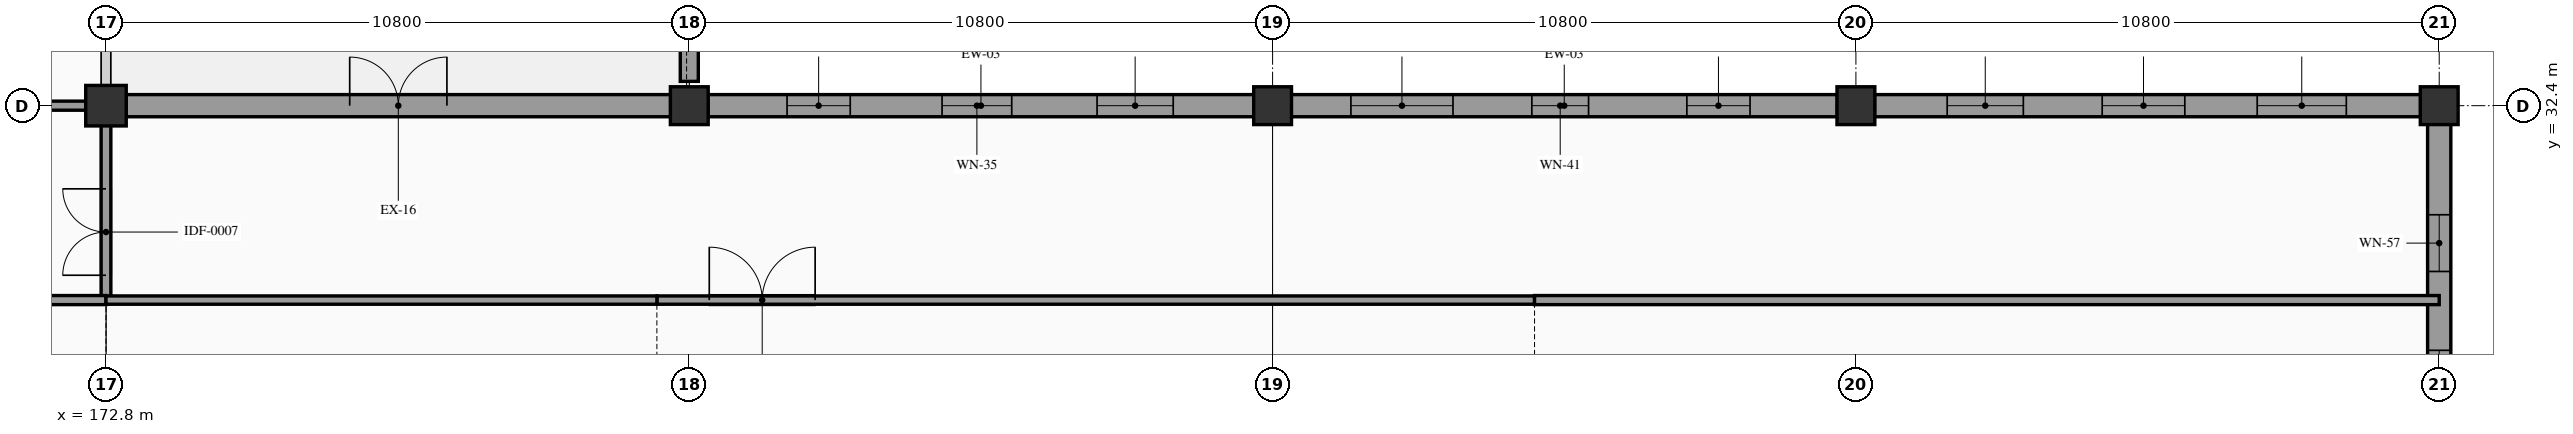
"""IFC4 building model, lengths in metres.
Left out: names, types, materials, properties, quantities, classifications, styles, units other than length and angle.
Written with IfcOpenShell. Run it as: python <this file> out.ifc"""

import sys

from ifc_helpers import new_model, si_unit, direction, frame, frame_2d, origin, origin_2d, place, context, subcontext, project, spatial, rectangle, extrude, element, fill, save


model = new_model("IFC4")
c1 = context("Model", 3, precision=1e-05, world=origin(), true_north=direction((0.0, 1.0)))
c2 = subcontext(c1, "Body", "Model", "MODEL_VIEW")
j1 = project(units=[si_unit("LENGTHUNIT", "METRE"), si_unit("PLANEANGLEUNIT", "RADIAN")], contexts=[c1])
p1 = place(None, origin())
s1 = spatial("IfcSite", under=j1, at=p1, CompositionType="ELEMENT")
p2 = place(p1, origin())
s2 = spatial("IfcBuilding", under=s1, at=p2, CompositionType="ELEMENT")
p3 = place(p2, origin())
s3 = spatial("IfcBuildingStorey", under=s2, at=p3, CompositionType="ELEMENT", Elevation=0.0)
p4 = place(p3, frame((172.8, 32.4, -1.2), z_axis=(0.0, 0.0, 1.0), x_axis=(1.0, 0.0, 0.0)))
e1 = element("IfcColumn", 1, at=p4, inside=s3, PredefinedType="COLUMN", context=c2, shape_type="SweptSolid", body=[
    extrude(rectangle(XDim=0.75, YDim=0.75, at=origin_2d()), origin(), (0.0, 0.0, 1.0), 6.6),
])
for number, where, z_axis, x_axis in (
    (2, (183.6, 32.4, -1.2), (0.0, 0.0, 1.0), (1.0, 0.0, 0.0)),
    (3, (194.4, 32.4, -1.2), (0.0, 0.0, 1.0), (1.0, 0.0, 0.0)),
    (4, (205.2, 32.4, -1.2), (0.0, 0.0, 1.0), (1.0, 0.0, 0.0)),
    (5, (216.0, 32.4, -1.2), (0.0, 0.0, 1.0), (1.0, 0.0, 0.0)),
):
    element("IfcColumn", number, at=place(p3, frame(where, z_axis=z_axis, x_axis=x_axis)), inside=s3, PredefinedType="COLUMN", context=c2, shape_type="SweptSolid", body=[
        extrude(rectangle(XDim=0.7, YDim=0.7, at=origin_2d()), origin(), (0.0, 0.0, 1.0), 6.6),
    ])
p5 = place(p3, frame((216.0, 0.45, -1.2), z_axis=(0.0, 0.0, 1.0), x_axis=(0.0, 1.0, 0.0)))
e6 = element("IfcWall", 6, at=p5, inside=s3, PredefinedType="USERDEFINED", context=c2, shape_type="SweptSolid", body=[
    extrude(rectangle(XDim=31.5, YDim=0.374, at=frame_2d((15.75, 0.0))), origin(), (0.0, 0.0, 1.0), 0.14),
])
p6 = place(p3, frame((183.6, 32.85, -1.2), z_axis=(0.0, 0.0, 1.0), x_axis=(0.0, 1.0, 0.0)))
e7 = element("IfcWall", 7, at=p6, inside=s3, PredefinedType="USERDEFINED", context=c2, shape_type="SweptSolid", body=[
    extrude(rectangle(XDim=63.9, YDim=0.334, at=frame_2d((31.95, 0.0))), origin(), (0.0, 0.0, 1.0), 0.14),
])
p7 = place(p3, frame((173.17, 32.4, 0.0), z_axis=(0.0, 0.0, 1.0), x_axis=(1.0, 0.0, 0.0)))
e8 = element("IfcWall", 8, at=p7, inside=s3, PredefinedType="STANDARD", context=c2, shape_type="SweptSolid", body=[
    extrude(rectangle(XDim=10.085, YDim=0.41, at=frame_2d((5.042, 0.0))), origin(), (0.0, 0.0, 1.0), 4.225),
])
p8 = place(p7, frame((4.143, 0.0, 0.0)))
e9 = element("IfcOpeningElement", 9, at=p8, cuts=e8, PredefinedType="OPENING", context=c2, shape_type="SweptSolid", body=[
    extrude(rectangle(XDim=1.8, YDim=2.3, at=frame_2d((0.9, 1.15))), frame((0.0, 0.215, 0.0), z_axis=(0.0, -1.0, 0.0), x_axis=(1.0, 0.0, 0.0)), (0.0, 0.0, 1.0), 0.43),
])
p9 = place(p3, frame((183.945, 32.4, 0.0), z_axis=(0.0, 0.0, 1.0), x_axis=(1.0, 0.0, 0.0)))
e10 = element("IfcWall", 10, at=p9, inside=s3, PredefinedType="STANDARD", context=c2, shape_type="SweptSolid", body=[
    extrude(rectangle(XDim=10.11, YDim=0.41, at=frame_2d((5.055, 0.0))), origin(), (0.0, 0.0, 1.0), 4.225),
])
p10 = place(p9, frame((1.465, 0.0, 0.95)))
e11 = element("IfcOpeningElement", 11, at=p10, cuts=e10, PredefinedType="OPENING", context=c2, shape_type="SweptSolid", body=[
    extrude(rectangle(XDim=1.17, YDim=1.5, at=frame_2d((0.585, 0.75))), frame((0.0, 0.215, 0.0), z_axis=(0.0, -1.0, 0.0), x_axis=(1.0, 0.0, 0.0)), (0.0, 0.0, 1.0), 0.43),
])
p11 = place(p9, frame((4.335, 0.0, 0.95)))
e12 = element("IfcOpeningElement", 12, at=p11, cuts=e10, PredefinedType="OPENING", context=c2, shape_type="SweptSolid", body=[
    extrude(rectangle(XDim=1.29, YDim=1.5, at=frame_2d((0.645, 0.75))), frame((0.0, 0.215, 0.0), z_axis=(0.0, -1.0, 0.0), x_axis=(1.0, 0.0, 0.0)), (0.0, 0.0, 1.0), 0.43),
])
p12 = place(p9, frame((7.205, 0.0, 0.95)))
e13 = element("IfcOpeningElement", 13, at=p12, cuts=e10, PredefinedType="OPENING", context=c2, shape_type="SweptSolid", body=[
    extrude(rectangle(XDim=1.41, YDim=1.5, at=frame_2d((0.705, 0.75))), frame((0.0, 0.215, 0.0), z_axis=(0.0, -1.0, 0.0), x_axis=(1.0, 0.0, 0.0)), (0.0, 0.0, 1.0), 0.43),
])
p13 = place(p3, frame((194.745, 32.4, 0.0), z_axis=(0.0, 0.0, 1.0), x_axis=(1.0, 0.0, 0.0)))
e14 = element("IfcWall", 14, at=p13, inside=s3, PredefinedType="STANDARD", context=c2, shape_type="SweptSolid", body=[
    extrude(rectangle(XDim=10.11, YDim=0.41, at=frame_2d((5.055, 0.0))), origin(), (0.0, 0.0, 1.0), 4.225),
])
p14 = place(p13, frame((1.105, 0.0, 0.95)))
e15 = element("IfcOpeningElement", 15, at=p14, cuts=e14, PredefinedType="OPENING", context=c2, shape_type="SweptSolid", body=[
    extrude(rectangle(XDim=1.89, YDim=1.5, at=frame_2d((0.945, 0.75))), frame((0.0, 0.215, 0.0), z_axis=(0.0, -1.0, 0.0), x_axis=(1.0, 0.0, 0.0)), (0.0, 0.0, 1.0), 0.43),
])
p15 = place(p13, frame((4.455, 0.0, 0.95)))
e16 = element("IfcOpeningElement", 16, at=p15, cuts=e14, PredefinedType="OPENING", context=c2, shape_type="SweptSolid", body=[
    extrude(rectangle(XDim=1.05, YDim=1.65, at=frame_2d((0.525, 0.825))), frame((0.0, 0.215, 0.0), z_axis=(0.0, -1.0, 0.0), x_axis=(1.0, 0.0, 0.0)), (0.0, 0.0, 1.0), 0.43),
])
p16 = place(p13, frame((7.325, 0.0, 0.95)))
e17 = element("IfcOpeningElement", 17, at=p16, cuts=e14, PredefinedType="OPENING", context=c2, shape_type="SweptSolid", body=[
    extrude(rectangle(XDim=1.17, YDim=1.65, at=frame_2d((0.585, 0.825))), frame((0.0, 0.215, 0.0), z_axis=(0.0, -1.0, 0.0), x_axis=(1.0, 0.0, 0.0)), (0.0, 0.0, 1.0), 0.43),
])
p17 = place(p3, frame((205.545, 32.4, 0.0), z_axis=(0.0, 0.0, 1.0), x_axis=(1.0, 0.0, 0.0)))
e18 = element("IfcWall", 18, at=p17, inside=s3, PredefinedType="STANDARD", context=c2, shape_type="SweptSolid", body=[
    extrude(rectangle(XDim=10.11, YDim=0.41, at=frame_2d((5.055, 0.0))), origin(), (0.0, 0.0, 1.0), 4.225),
])
p18 = place(p17, frame((1.345, 0.0, 0.95)))
e19 = element("IfcOpeningElement", 19, at=p18, cuts=e18, PredefinedType="OPENING", context=c2, shape_type="SweptSolid", body=[
    extrude(rectangle(XDim=1.41, YDim=1.8, at=frame_2d((0.705, 0.9))), frame((0.0, 0.215, 0.0), z_axis=(0.0, -1.0, 0.0), x_axis=(1.0, 0.0, 0.0)), (0.0, 0.0, 1.0), 0.43),
])
p19 = place(p17, frame((4.215, 0.0, 0.95)))
e20 = element("IfcOpeningElement", 20, at=p19, cuts=e18, PredefinedType="OPENING", context=c2, shape_type="SweptSolid", body=[
    extrude(rectangle(XDim=1.53, YDim=1.8, at=frame_2d((0.765, 0.9))), frame((0.0, 0.215, 0.0), z_axis=(0.0, -1.0, 0.0), x_axis=(1.0, 0.0, 0.0)), (0.0, 0.0, 1.0), 0.43),
])
p20 = place(p17, frame((7.085, 0.0, 0.95)))
e21 = element("IfcOpeningElement", 21, at=p20, cuts=e18, PredefinedType="OPENING", context=c2, shape_type="SweptSolid", body=[
    extrude(rectangle(XDim=1.65, YDim=1.8, at=frame_2d((0.825, 0.9))), frame((0.0, 0.215, 0.0), z_axis=(0.0, -1.0, 0.0), x_axis=(1.0, 0.0, 0.0)), (0.0, 0.0, 1.0), 0.43),
])
p21 = place(p3, frame((216.0, 21.945, 0.0), z_axis=(0.0, 0.0, 1.0), x_axis=(0.0, 1.0, 0.0)))
e22 = element("IfcWall", 22, at=p21, inside=s3, PredefinedType="STANDARD", context=c2, shape_type="SweptSolid", body=[
    extrude(rectangle(XDim=10.11, YDim=0.43, at=frame_2d((5.055, 0.0))), origin(), (0.0, 0.0, 1.0), 4.225),
])
p22 = place(p21, frame((1.165, 0.0, 0.95)))
e23 = element("IfcOpeningElement", 23, at=p22, cuts=e22, PredefinedType="OPENING", context=c2, shape_type="SweptSolid", body=[
    extrude(rectangle(XDim=1.77, YDim=1.8, at=frame_2d((0.885, 0.9))), frame((0.0, 0.225, 0.0), z_axis=(0.0, -1.0, 0.0), x_axis=(1.0, 0.0, 0.0)), (0.0, 0.0, 1.0), 0.45),
])
p23 = place(p21, frame((4.035, 0.0, 0.95)))
e24 = element("IfcOpeningElement", 24, at=p23, cuts=e22, PredefinedType="OPENING", context=c2, shape_type="SweptSolid", body=[
    extrude(rectangle(XDim=1.89, YDim=1.8, at=frame_2d((0.945, 0.9))), frame((0.0, 0.225, 0.0), z_axis=(0.0, -1.0, 0.0), x_axis=(1.0, 0.0, 0.0)), (0.0, 0.0, 1.0), 0.45),
])
p24 = place(p21, frame((7.385, 0.0, 0.95)))
e25 = element("IfcOpeningElement", 25, at=p24, cuts=e22, PredefinedType="OPENING", context=c2, shape_type="SweptSolid", body=[
    extrude(rectangle(XDim=1.05, YDim=1.95, at=frame_2d((0.525, 0.975))), frame((0.0, 0.225, 0.0), z_axis=(0.0, -1.0, 0.0), x_axis=(1.0, 0.0, 0.0)), (0.0, 0.0, 1.0), 0.45),
])
p25 = place(p3, frame((172.8, 28.8, 0.0), z_axis=(0.0, 0.0, 1.0), x_axis=(0.0, 1.0, 0.0)))
e26 = element("IfcWall", 26, at=p25, inside=s3, PredefinedType="PARTITIONING", context=c2, shape_type="SweptSolid", body=[
    extrude(rectangle(XDim=3.6, YDim=0.18, at=frame_2d((1.8, 0.0))), origin(), (0.0, 0.0, 1.0), 3.95),
])
p26 = place(p25, frame((0.46, 0.0, 0.0)))
e27 = element("IfcOpeningElement", 27, at=p26, cuts=e26, PredefinedType="OPENING", context=c2, shape_type="SweptSolid", body=[
    extrude(rectangle(XDim=1.6, YDim=2.2, at=frame_2d((0.8, 1.1))), frame((0.0, 0.1, 0.0), z_axis=(0.0, -1.0, 0.0), x_axis=(1.0, 0.0, 0.0)), (0.0, 0.0, 1.0), 0.2),
])
p27 = place(p3, frame((183.0, 28.8, 0.0), z_axis=(0.0, 0.0, 1.0), x_axis=(1.0, 0.0, 0.0)))
e28 = element("IfcWall", 28, at=p27, inside=s3, PredefinedType="PARTITIONING", context=c2, shape_type="SweptSolid", body=[
    extrude(rectangle(XDim=16.25, YDim=0.154, at=frame_2d((8.125, 0.0))), origin(), (0.0, 0.0, 1.0), 3.95),
])
p28 = place(p27, frame((0.97, 0.0, 0.0)))
e29 = element("IfcOpeningElement", 29, at=p28, cuts=e28, PredefinedType="OPENING", context=c2, shape_type="SweptSolid", body=[
    extrude(rectangle(XDim=1.96, YDim=2.3, at=frame_2d((0.98, 1.15))), frame((0.0, 0.087, 0.0), z_axis=(0.0, -1.0, 0.0), x_axis=(1.0, 0.0, 0.0)), (0.0, 0.0, 1.0), 0.174),
])
p29 = place(p3, frame((162.0, 32.4, 0.0), z_axis=(0.0, 0.0, 1.0), x_axis=(1.0, 0.0, 0.0)))
e30 = element("IfcWall", 30, at=p29, inside=s3, PredefinedType="PARTITIONING", context=c2, shape_type="SweptSolid", body=[
    extrude(rectangle(XDim=10.8, YDim=0.168, at=frame_2d((5.4, 0.0))), origin(), (0.0, 0.0, 1.0), 3.95),
])
p30 = place(p3, frame((163.2, 28.8, 0.0), z_axis=(0.0, 0.0, 1.0), x_axis=(1.0, 0.0, 0.0)))
e31 = element("IfcWall", 31, at=p30, inside=s3, PredefinedType="PARTITIONING", context=c2, shape_type="SweptSolid", body=[
    extrude(rectangle(XDim=9.6, YDim=0.168, at=frame_2d((4.8, 0.0))), origin(), (0.0, 0.0, 1.0), 3.95),
])
p31 = place(p3, frame((172.8, 28.8, 0.0), z_axis=(0.0, 0.0, 1.0), x_axis=(1.0, 0.0, 0.0)))
e32 = element("IfcWall", 32, at=p31, inside=s3, PredefinedType="PARTITIONING", context=c2, shape_type="SweptSolid", body=[
    extrude(rectangle(XDim=10.2, YDim=0.154, at=frame_2d((5.1, 0.0))), origin(), (0.0, 0.0, 1.0), 3.95),
])
for number, where, z_axis, x_axis in (
    (33, (183.275, 32.4, 0.0), (0.0, 0.0, 1.0), (1.0, 0.0, 0.0)),
    (34, (194.075, 32.4, 0.0), (0.0, 0.0, 1.0), (1.0, 0.0, 0.0)),
):
    element("IfcWall", number, at=place(p3, frame(where, z_axis=z_axis, x_axis=x_axis)), inside=s3, PredefinedType="PARTITIONING", context=c2, shape_type="SweptSolid", body=[
        extrude(rectangle(XDim=0.65, YDim=0.168, at=frame_2d((0.325, 0.0))), origin(), (0.0, 0.0, 1.0), 3.95),
    ])
p32 = place(p3, frame((204.875, 32.4, 0.0), z_axis=(0.0, 0.0, 1.0), x_axis=(1.0, 0.0, 0.0)))
e35 = element("IfcWall", 35, at=p32, inside=s3, PredefinedType="PARTITIONING", context=c2, shape_type="SweptSolid", body=[
    extrude(rectangle(XDim=0.65, YDim=0.168, at=frame_2d((0.325, 0.0))), origin(), (0.0, 0.0, 1.0), 3.95),
])
p33 = place(p3, frame((199.25, 28.8, 0.0), z_axis=(0.0, 0.0, 1.0), x_axis=(1.0, 0.0, 0.0)))
e36 = element("IfcWall", 36, at=p33, inside=s3, PredefinedType="PARTITIONING", context=c2, shape_type="SweptSolid", body=[
    extrude(rectangle(XDim=16.75, YDim=0.168, at=frame_2d((8.375, 0.0))), origin(), (0.0, 0.0, 1.0), 3.95),
])
p34 = place(p8, origin())
e37 = element("IfcDoor", 37, at=p34, inside=s3, OperationType="DOUBLE_DOOR_SINGLE_SWING", PredefinedType="DOOR", context=c2, shape_type="SweptSolid", body=[
    extrude(rectangle(XDim=1.8, YDim=2.3, at=frame_2d((0.9, 1.15))), frame((0.0, 0.025, 0.0), z_axis=(0.0, -1.0, 0.0), x_axis=(1.0, 0.0, 0.0)), (0.0, 0.0, 1.0), 0.05),
])
fill(e9, e37)
p35 = place(p10, origin())
e38 = element("IfcWindow", 38, at=p35, inside=s3, PartitioningType="SINGLE_PANEL", PredefinedType="WINDOW", context=c2, shape_type="SweptSolid", body=[
    extrude(rectangle(XDim=1.17, YDim=1.5, at=frame_2d((0.585, 0.75))), frame((0.0, 0.03, 0.0), z_axis=(0.0, -1.0, 0.0), x_axis=(1.0, 0.0, 0.0)), (0.0, 0.0, 1.0), 0.06),
])
fill(e11, e38)
p36 = place(p11, origin())
e39 = element("IfcWindow", 39, at=p36, inside=s3, PartitioningType="SINGLE_PANEL", PredefinedType="WINDOW", context=c2, shape_type="SweptSolid", body=[
    extrude(rectangle(XDim=1.29, YDim=1.5, at=frame_2d((0.645, 0.75))), frame((0.0, 0.03, 0.0), z_axis=(0.0, -1.0, 0.0), x_axis=(1.0, 0.0, 0.0)), (0.0, 0.0, 1.0), 0.06),
])
fill(e12, e39)
p37 = place(p12, origin())
e40 = element("IfcWindow", 40, at=p37, inside=s3, PartitioningType="SINGLE_PANEL", PredefinedType="WINDOW", context=c2, shape_type="SweptSolid", body=[
    extrude(rectangle(XDim=1.41, YDim=1.5, at=frame_2d((0.705, 0.75))), frame((0.0, 0.03, 0.0), z_axis=(0.0, -1.0, 0.0), x_axis=(1.0, 0.0, 0.0)), (0.0, 0.0, 1.0), 0.06),
])
fill(e13, e40)
p38 = place(p14, origin())
e41 = element("IfcWindow", 41, at=p38, inside=s3, PartitioningType="SINGLE_PANEL", PredefinedType="WINDOW", context=c2, shape_type="SweptSolid", body=[
    extrude(rectangle(XDim=1.89, YDim=1.5, at=frame_2d((0.945, 0.75))), frame((0.0, 0.03, 0.0), z_axis=(0.0, -1.0, 0.0), x_axis=(1.0, 0.0, 0.0)), (0.0, 0.0, 1.0), 0.06),
])
fill(e15, e41)
p39 = place(p15, origin())
e42 = element("IfcWindow", 42, at=p39, inside=s3, PartitioningType="SINGLE_PANEL", PredefinedType="WINDOW", context=c2, shape_type="SweptSolid", body=[
    extrude(rectangle(XDim=1.05, YDim=1.65, at=frame_2d((0.525, 0.825))), frame((0.0, 0.03, 0.0), z_axis=(0.0, -1.0, 0.0), x_axis=(1.0, 0.0, 0.0)), (0.0, 0.0, 1.0), 0.06),
])
fill(e16, e42)
p40 = place(p16, origin())
e43 = element("IfcWindow", 43, at=p40, inside=s3, PartitioningType="SINGLE_PANEL", PredefinedType="WINDOW", context=c2, shape_type="SweptSolid", body=[
    extrude(rectangle(XDim=1.17, YDim=1.65, at=frame_2d((0.585, 0.825))), frame((0.0, 0.03, 0.0), z_axis=(0.0, -1.0, 0.0), x_axis=(1.0, 0.0, 0.0)), (0.0, 0.0, 1.0), 0.06),
])
fill(e17, e43)
p41 = place(p18, origin())
e44 = element("IfcWindow", 44, at=p41, inside=s3, PartitioningType="SINGLE_PANEL", PredefinedType="WINDOW", context=c2, shape_type="SweptSolid", body=[
    extrude(rectangle(XDim=1.41, YDim=1.8, at=frame_2d((0.705, 0.9))), frame((0.0, 0.03, 0.0), z_axis=(0.0, -1.0, 0.0), x_axis=(1.0, 0.0, 0.0)), (0.0, 0.0, 1.0), 0.06),
])
fill(e19, e44)
p42 = place(p19, origin())
e45 = element("IfcWindow", 45, at=p42, inside=s3, PartitioningType="SINGLE_PANEL", PredefinedType="WINDOW", context=c2, shape_type="SweptSolid", body=[
    extrude(rectangle(XDim=1.53, YDim=1.8, at=frame_2d((0.765, 0.9))), frame((0.0, 0.03, 0.0), z_axis=(0.0, -1.0, 0.0), x_axis=(1.0, 0.0, 0.0)), (0.0, 0.0, 1.0), 0.06),
])
fill(e20, e45)
p43 = place(p20, origin())
e46 = element("IfcWindow", 46, at=p43, inside=s3, PartitioningType="SINGLE_PANEL", PredefinedType="WINDOW", context=c2, shape_type="SweptSolid", body=[
    extrude(rectangle(XDim=1.65, YDim=1.8, at=frame_2d((0.825, 0.9))), frame((0.0, 0.03, 0.0), z_axis=(0.0, -1.0, 0.0), x_axis=(1.0, 0.0, 0.0)), (0.0, 0.0, 1.0), 0.06),
])
fill(e21, e46)
p44 = place(p23, frame((1.89, 0.0, 0.0), z_axis=(0.0, 0.0, 1.0), x_axis=(-1.0, 0.0, 0.0)))
e47 = element("IfcWindow", 47, at=p44, inside=s3, PartitioningType="SINGLE_PANEL", PredefinedType="WINDOW", context=c2, shape_type="SweptSolid", body=[
    extrude(rectangle(XDim=1.89, YDim=1.8, at=frame_2d((0.945, 0.9))), frame((0.0, 0.03, 0.0), z_axis=(0.0, -1.0, 0.0), x_axis=(1.0, 0.0, 0.0)), (0.0, 0.0, 1.0), 0.06),
])
fill(e24, e47)
p45 = place(p24, frame((1.05, 0.0, 0.0), z_axis=(0.0, 0.0, 1.0), x_axis=(-1.0, 0.0, 0.0)))
e48 = element("IfcWindow", 48, at=p45, inside=s3, PartitioningType="SINGLE_PANEL", PredefinedType="WINDOW", context=c2, shape_type="SweptSolid", body=[
    extrude(rectangle(XDim=1.05, YDim=1.95, at=frame_2d((0.525, 0.975))), frame((0.0, 0.03, 0.0), z_axis=(0.0, -1.0, 0.0), x_axis=(1.0, 0.0, 0.0)), (0.0, 0.0, 1.0), 0.06),
])
fill(e25, e48)
p46 = place(p26, origin())
e49 = element("IfcDoor", 49, at=p46, inside=s3, OperationType="DOUBLE_DOOR_SINGLE_SWING", PredefinedType="DOOR", context=c2, shape_type="SweptSolid", body=[
    extrude(rectangle(XDim=1.6, YDim=2.2, at=frame_2d((0.8, 1.1))), frame((0.0, 0.025, 0.0), z_axis=(0.0, -1.0, 0.0), x_axis=(1.0, 0.0, 0.0)), (0.0, 0.0, 1.0), 0.05),
])
fill(e27, e49)
p47 = place(p28, origin())
e50 = element("IfcDoor", 50, at=p47, inside=s3, OperationType="DOUBLE_DOOR_SINGLE_SWING", PredefinedType="DOOR", context=c2, shape_type="SweptSolid", body=[
    extrude(rectangle(XDim=1.96, YDim=2.3, at=frame_2d((0.98, 1.15))), frame((0.0, 0.025, 0.0), z_axis=(0.0, -1.0, 0.0), x_axis=(1.0, 0.0, 0.0)), (0.0, 0.0, 1.0), 0.05),
])
fill(e29, e50)
save(model, sys.argv[1])
